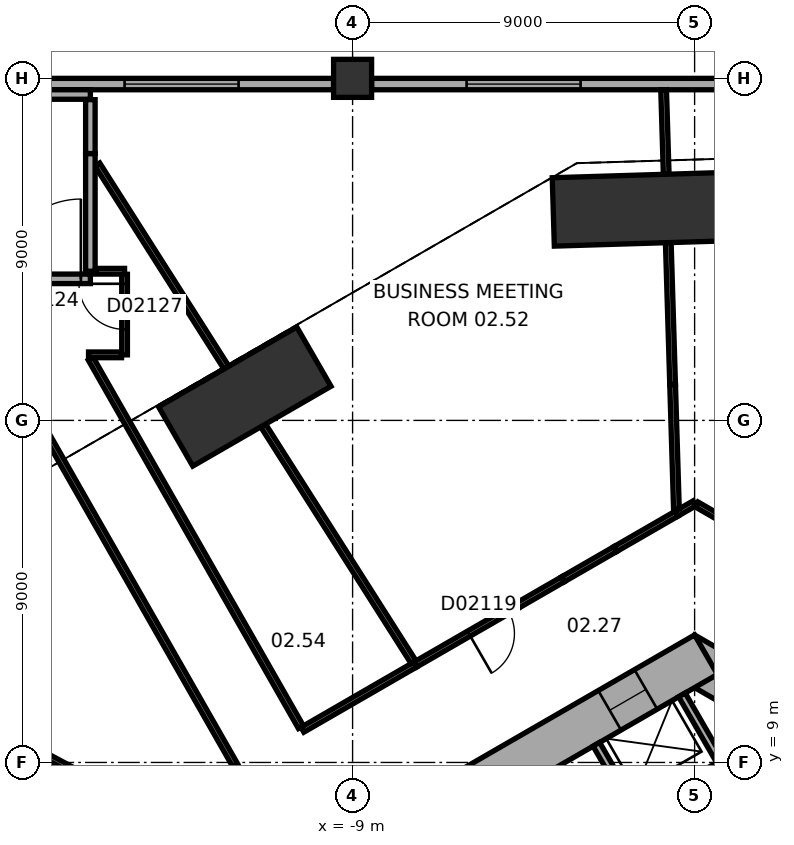
"""IFC4 building model, lengths in metres.
Left out: names, types, materials, properties, quantities, classifications, styles, units other than length and angle.
Written with IfcOpenShell. Run it as: python <this file> out.ifc"""

import sys

from ifc_helpers import new_model, si_unit, direction, frame, frame_2d, origin, origin_2d, place, context, subcontext, project, spatial, rectangle, extrude, element, fill, save


model = new_model("IFC4")
c1 = context("Model", 3, precision=1e-05, world=origin(), true_north=direction((0.0, 1.0)))
c2 = subcontext(c1, "Body", "Model", "MODEL_VIEW")
j1 = project(units=[si_unit("LENGTHUNIT", "METRE"), si_unit("PLANEANGLEUNIT", "RADIAN")], contexts=[c1])
p1 = place(None, origin())
s1 = spatial("IfcSite", under=j1, at=p1, CompositionType="ELEMENT")
p2 = place(p1, origin())
s2 = spatial("IfcBuilding", under=s1, at=p2, CompositionType="ELEMENT")
p3 = place(p2, frame((0.0, 0.0, 13.0)))
s3 = spatial("IfcBuildingStorey", under=s2, at=p3, CompositionType="ELEMENT", Elevation=13.0)
p4 = place(p3, frame((-0.72, 23.577, 0.0), z_axis=(0.0, 0.0, 1.0), x_axis=(-0.999533644135, -0.030536768695, 0.0)))
e1 = element("IfcColumn", 1, at=p4, inside=s3, PredefinedType="COLUMN", context=c2, shape_type="SweptSolid", body=[
    extrude(rectangle(XDim=6.0, YDim=1.8, at=origin_2d()), origin(), (0.0, 0.0, 1.0), 8.0),
])
p5 = place(p3, frame((-11.837, 18.627, 0.0), z_axis=(0.0, 0.0, 1.0), x_axis=(-0.866028021766, -0.499995465495, 0.0)))
e2 = element("IfcColumn", 2, at=p5, inside=s3, PredefinedType="COLUMN", context=c2, shape_type="SweptSolid", body=[
    extrude(rectangle(XDim=4.2, YDim=1.8, at=origin_2d()), origin(), (0.0, 0.0, 1.0), 8.0),
])
p6 = place(p3, frame((-9.0, 27.0, 0.0), z_axis=(0.0, 0.0, 1.0), x_axis=(1.0, 0.0, 0.0)))
e3 = element("IfcColumn", 3, at=p6, inside=s3, PredefinedType="COLUMN", context=c2, shape_type="SweptSolid", body=[
    extrude(rectangle(XDim=1.0, YDim=1.0, at=origin_2d()), origin(), (0.0, 0.0, 1.0), 8.0),
])
p7 = place(p3, frame((10.4, 5.658, 0.0), z_axis=(0.0, 0.0, 1.0), x_axis=(-0.866021384402, 0.500006961711, 0.0)))
e4 = element("IfcWall", 4, at=p7, inside=s3, PredefinedType="SHEAR", context=c2, shape_type="SweptSolid", body=[
    extrude(rectangle(XDim=12.355, YDim=1.2, at=frame_2d((6.178, 0.0))), origin(), (0.0, 0.0, 1.0), 8.0),
])
p8 = place(p7, frame((2.728, 0.0, 0.0)))
e5 = element("IfcOpeningElement", 5, at=p8, cuts=e4, PredefinedType="OPENING", context=c2, shape_type="SweptSolid", body=[
    extrude(rectangle(XDim=1.1, YDim=2.1, at=frame_2d((0.55, 1.05))), frame((0.0, 0.61, 0.0), z_axis=(0.0, -1.0, 0.0), x_axis=(1.0, 0.0, 0.0)), (0.0, 0.0, 1.0), 1.22),
])
p9 = place(p7, frame((5.328, 0.0, 0.0)))
e6 = element("IfcOpeningElement", 6, at=p9, cuts=e4, PredefinedType="OPENING", context=c2, shape_type="SweptSolid", body=[
    extrude(rectangle(XDim=1.1, YDim=2.1, at=frame_2d((0.55, 1.05))), frame((0.0, 0.61, 0.0), z_axis=(0.0, -1.0, 0.0), x_axis=(1.0, 0.0, 0.0)), (0.0, 0.0, 1.0), 1.22),
])
p10 = place(p7, frame((7.928, 0.0, 0.0)))
e7 = element("IfcOpeningElement", 7, at=p10, cuts=e4, PredefinedType="OPENING", context=c2, shape_type="SweptSolid", body=[
    extrude(rectangle(XDim=1.1, YDim=2.1, at=frame_2d((0.55, 1.05))), frame((0.0, 0.61, 0.0), z_axis=(0.0, -1.0, 0.0), x_axis=(1.0, 0.0, 0.0)), (0.0, 0.0, 1.0), 1.22),
])
p11 = place(p3, frame((0.3, 11.836, 0.0), z_axis=(0.0, 0.0, 1.0), x_axis=(-0.866021384402, -0.500006961711, 0.0)))
e8 = element("IfcWall", 8, at=p11, inside=s3, PredefinedType="SHEAR", context=c2, shape_type="SweptSolid", body=[
    extrude(rectangle(XDim=12.355, YDim=1.2, at=frame_2d((6.178, 0.0))), origin(), (0.0, 0.0, 1.0), 8.0),
])
p12 = place(p11, frame((6.378, 0.0, 0.0)))
e9 = element("IfcOpeningElement", 9, at=p12, cuts=e8, PredefinedType="OPENING", context=c2, shape_type="SweptSolid", body=[
    extrude(rectangle(XDim=1.5, YDim=2.1, at=frame_2d((0.75, 1.05))), frame((0.0, 0.61, 0.0), z_axis=(0.0, -1.0, 0.0), x_axis=(1.0, 0.0, 0.0)), (0.0, 0.0, 1.0), 1.22),
])
p13 = place(p11, frame((1.828, 0.0, 0.0)))
e10 = element("IfcOpeningElement", 10, at=p13, cuts=e8, PredefinedType="OPENING", context=c2, shape_type="SweptSolid", body=[
    extrude(rectangle(XDim=1.1, YDim=2.1, at=frame_2d((0.55, 1.05))), frame((0.0, 0.61, 0.0), z_axis=(0.0, -1.0, 0.0), x_axis=(1.0, 0.0, 0.0)), (0.0, 0.0, 1.0), 1.22),
])
p14 = place(p3, frame((8.5, 26.85, 0.0), z_axis=(0.0, 0.0, 1.0), x_axis=(-1.0, 0.0, 0.0)))
e11 = element("IfcWall", 11, at=p14, inside=s3, PredefinedType="STANDARD", context=c2, shape_type="SweptSolid", body=[
    extrude(rectangle(XDim=17.0, YDim=0.3, at=frame_2d((8.5, 0.0))), origin(), (0.0, 0.0, 1.0), 6.5),
])
p15 = place(p14, frame((2.5, 0.0, 1.0)))
e12 = element("IfcOpeningElement", 12, at=p15, cuts=e11, PredefinedType="OPENING", context=c2, shape_type="SweptSolid", body=[
    extrude(rectangle(XDim=3.0, YDim=4.0, at=frame_2d((1.5, 2.0))), frame((0.0, 0.16, 0.0), z_axis=(0.0, -1.0, 0.0), x_axis=(1.0, 0.0, 0.0)), (0.0, 0.0, 1.0), 0.32),
])
p16 = place(p14, frame((11.5, 0.0, 1.0)))
e13 = element("IfcOpeningElement", 13, at=p16, cuts=e11, PredefinedType="OPENING", context=c2, shape_type="SweptSolid", body=[
    extrude(rectangle(XDim=3.0, YDim=4.0, at=frame_2d((1.5, 2.0))), frame((0.0, 0.16, 0.0), z_axis=(0.0, -1.0, 0.0), x_axis=(1.0, 0.0, 0.0)), (0.0, 0.0, 1.0), 0.32),
])
p17 = place(p3, frame((-9.5, 26.85, 0.0), z_axis=(0.0, 0.0, 1.0), x_axis=(-1.0, 0.0, 0.0)))
e14 = element("IfcWall", 14, at=p17, inside=s3, PredefinedType="STANDARD", context=c2, shape_type="SweptSolid", body=[
    extrude(rectangle(XDim=17.0, YDim=0.3, at=frame_2d((8.5, 0.0))), origin(), (0.0, 0.0, 1.0), 6.5),
])
p18 = place(p17, frame((2.5, 0.0, 1.0)))
e15 = element("IfcOpeningElement", 15, at=p18, cuts=e14, PredefinedType="OPENING", context=c2, shape_type="SweptSolid", body=[
    extrude(rectangle(XDim=3.0, YDim=4.0, at=frame_2d((1.5, 2.0))), frame((0.0, 0.16, 0.0), z_axis=(0.0, -1.0, 0.0), x_axis=(1.0, 0.0, 0.0)), (0.0, 0.0, 1.0), 0.32),
])
p19 = place(p17, frame((11.5, 0.0, 1.0)))
e16 = element("IfcOpeningElement", 16, at=p19, cuts=e14, PredefinedType="OPENING", context=c2, shape_type="SweptSolid", body=[
    extrude(rectangle(XDim=3.0, YDim=4.0, at=frame_2d((1.5, 2.0))), frame((0.0, 0.16, 0.0), z_axis=(0.0, -1.0, 0.0), x_axis=(1.0, 0.0, 0.0)), (0.0, 0.0, 1.0), 0.32),
])
p20 = place(p3, frame((0.532, 8.122, 0.0), z_axis=(0.0, 0.0, 1.0), x_axis=(0.500077893725, 0.86598042715, 0.0)))
e17 = element("IfcWall", 17, at=p20, inside=s3, PredefinedType="PARTITIONING", context=c2, shape_type="SweptSolid", body=[
    extrude(rectangle(XDim=2.2, YDim=0.2, at=frame_2d((1.1, 0.0))), origin(), (0.0, 0.0, 1.0), 7.7),
])
p21 = place(p3, frame((0.803, 9.009, 0.0), z_axis=(0.0, 0.0, 1.0), x_axis=(-0.866028230842, -0.499995103361, 0.0)))
e18 = element("IfcWall", 18, at=p21, inside=s3, PredefinedType="PARTITIONING", context=c2, shape_type="SweptSolid", body=[
    extrude(rectangle(XDim=5.4, YDim=0.2, at=frame_2d((2.7, 0.0))), origin(), (0.0, 0.0, 1.0), 7.7),
])
p22 = place(p3, frame((0.767, 8.872, 0.0), z_axis=(0.0, 0.0, 1.0), x_axis=(-0.499994660107, 0.866028486751, 0.0)))
e19 = element("IfcWall", 19, at=p22, inside=s3, PredefinedType="PARTITIONING", context=c2, shape_type="SweptSolid", body=[
    extrude(rectangle(XDim=2.2, YDim=0.2, at=frame_2d((1.1, 0.0))), origin(), (0.0, 0.0, 1.0), 7.7),
])
p23 = place(p3, frame((-1.485, 7.572, 0.0), z_axis=(0.0, 0.0, 1.0), x_axis=(-0.50002983664, 0.866008176907, 0.0)))
e20 = element("IfcWall", 20, at=p23, inside=s3, PredefinedType="PARTITIONING", context=c2, shape_type="SweptSolid", body=[
    extrude(rectangle(XDim=2.2, YDim=0.2, at=frame_2d((1.1, 0.0))), origin(), (0.0, 0.0, 1.0), 7.7),
])
p24 = place(p3, frame((-13.806, 7.418, 0.0), z_axis=(0.0, 0.0, 1.0), x_axis=(-0.880891557551, 0.473318142305, 0.0)))
e21 = element("IfcWall", 21, at=p24, inside=s3, PredefinedType="PARTITIONING", context=c2, shape_type="SweptSolid", body=[
    extrude(rectangle(XDim=7.787, YDim=0.15, at=frame_2d((3.894, 0.0))), origin(), (0.0, 0.0, 1.0), 7.7),
])
p25 = place(p3, frame((-12.092, 8.93, 0.0), z_axis=(0.0, 0.0, 1.0), x_axis=(-0.495564220718, 0.868571299977, 0.0)))
e22 = element("IfcWall", 22, at=p25, inside=s3, PredefinedType="PARTITIONING", context=c2, shape_type="SweptSolid", body=[
    extrude(rectangle(XDim=11.988, YDim=0.15, at=frame_2d((5.994, 0.0))), origin(), (0.0, 0.0, 1.0), 7.7),
])
p26 = place(p3, frame((-10.321, 9.861, 0.0), z_axis=(0.0, 0.0, 1.0), x_axis=(0.865970719175, 0.500094704563, 0.0)))
e23 = element("IfcWall", 23, at=p26, inside=s3, PredefinedType="PARTITIONING", context=c2, shape_type="SweptSolid", body=[
    extrude(rectangle(XDim=3.425, YDim=0.15, at=frame_2d((1.712, 0.0))), origin(), (0.0, 0.0, 1.0), 7.7),
])
p27 = place(p3, frame((-7.354, 11.573, 0.0), z_axis=(0.0, 0.0, 1.0), x_axis=(0.866051051954, 0.499955573435, 0.0)))
e24 = element("IfcWall", 24, at=p27, inside=s3, PredefinedType="PARTITIONING", context=c2, shape_type="SweptSolid", body=[
    extrude(rectangle(XDim=3.082, YDim=0.15, at=frame_2d((1.541, 0.0))), origin(), (0.0, 0.0, 1.0), 7.7),
])
p28 = place(p27, frame((1.632, 0.0, 0.0)))
e25 = element("IfcOpeningElement", 25, at=p28, cuts=e24, PredefinedType="OPENING", context=c2, shape_type="SweptSolid", body=[
    extrude(rectangle(XDim=1.2, YDim=2.1, at=frame_2d((0.6, 1.05))), frame((0.0, 0.085, 0.0), z_axis=(0.0, -1.0, 0.0), x_axis=(1.0, 0.0, 0.0)), (0.0, 0.0, 1.0), 0.17),
])
p29 = place(p3, frame((-7.397, 11.641, 0.0), z_axis=(0.0, 0.0, 1.0), x_axis=(-0.536312130721, 0.844019726334, 0.0)))
e26 = element("IfcWall", 26, at=p29, inside=s3, PredefinedType="PARTITIONING", context=c2, shape_type="SweptSolid", body=[
    extrude(rectangle(XDim=7.376, YDim=0.15, at=frame_2d((3.688, 0.0))), origin(), (0.0, 0.0, 1.0), 7.7),
])
p30 = place(p3, frame((-3.46, 13.822, 0.0), z_axis=(0.0, 0.0, 1.0), x_axis=(-0.866004557827, -0.500036104519, 0.0)))
e27 = element("IfcWall", 27, at=p30, inside=s3, PredefinedType="PARTITIONING", context=c2, shape_type="SweptSolid", body=[
    extrude(rectangle(XDim=1.415, YDim=0.15, at=frame_2d((0.708, 0.0))), origin(), (0.0, 0.0, 1.0), 7.7),
])
p31 = place(p3, frame((3.386, 13.865, 0.0), z_axis=(0.0, 0.0, 1.0), x_axis=(-0.866006051527, 0.500033517596, 0.0)))
e28 = element("IfcWall", 28, at=p31, inside=s3, PredefinedType="PARTITIONING", context=c2, shape_type="SweptSolid", body=[
    extrude(rectangle(XDim=3.85, YDim=0.15, at=frame_2d((1.925, 0.0))), origin(), (0.0, 0.0, 1.0), 7.7),
])
p32 = place(p3, frame((-2.087, 14.615, 0.0), z_axis=(0.0, 0.0, 1.0), x_axis=(-0.866054784643, -0.499949107407, 0.0)))
e29 = element("IfcWall", 29, at=p32, inside=s3, PredefinedType="PARTITIONING", context=c2, shape_type="SweptSolid", body=[
    extrude(rectangle(XDim=1.585, YDim=0.15, at=frame_2d((0.792, 0.0))), origin(), (0.0, 0.0, 1.0), 7.7),
])
p33 = place(p3, frame((-2.087, 14.615, 0.0), z_axis=(0.0, 0.0, 1.0), x_axis=(0.866006459158, 0.500032811619, 0.0)))
e30 = element("IfcWall", 30, at=p33, inside=s3, PredefinedType="PARTITIONING", context=c2, shape_type="SweptSolid", body=[
    extrude(rectangle(XDim=1.861, YDim=0.15, at=frame_2d((0.931, 0.0))), origin(), (0.0, 0.0, 1.0), 7.7),
])
p34 = place(p3, frame((-0.475, 15.545, 0.0), z_axis=(0.0, 0.0, 1.0), x_axis=(0.865933599817, 0.500158975434, 0.0)))
e31 = element("IfcWall", 31, at=p34, inside=s3, PredefinedType="PARTITIONING", context=c2, shape_type="SweptSolid", body=[
    extrude(rectangle(XDim=0.549, YDim=0.15, at=frame_2d((0.274, 0.0))), origin(), (0.0, 0.0, 1.0), 7.7),
])
p35 = place(p3, frame((-0.579, 18.946, 0.0), z_axis=(0.0, 0.0, 1.0), x_axis=(0.030572886356, -0.999532540051, 0.0)))
e32 = element("IfcWall", 32, at=p35, inside=s3, PredefinedType="PARTITIONING", context=c2, shape_type="SweptSolid", body=[
    extrude(rectangle(XDim=3.282, YDim=0.15, at=frame_2d((1.641, 0.0))), origin(), (0.0, 0.0, 1.0), 7.7),
])
p36 = place(p3, frame((-0.579, 18.946, 0.0), z_axis=(0.0, 0.0, 1.0), x_axis=(-0.030471255388, 0.999535643484, 0.0)))
e33 = element("IfcWall", 33, at=p36, inside=s3, PredefinedType="PARTITIONING", context=c2, shape_type="SweptSolid", body=[
    extrude(rectangle(XDim=3.734, YDim=0.15, at=frame_2d((1.867, 0.0))), origin(), (0.0, 0.0, 1.0), 7.7),
])
p37 = place(p3, frame((-12.32, 19.387, 0.0), z_axis=(0.0, 0.0, 1.0), x_axis=(-0.536309341483, 0.844021498682, 0.0)))
e34 = element("IfcWall", 34, at=p37, inside=s3, PredefinedType="PARTITIONING", context=c2, shape_type="SweptSolid", body=[
    extrude(rectangle(XDim=6.335, YDim=0.15, at=frame_2d((3.168, 0.0))), origin(), (0.0, 0.0, 1.0), 7.7),
])
p38 = place(p3, frame((-15.889, 19.621, 0.0), z_axis=(0.0, 0.0, 1.0), x_axis=(0.495540263005, -0.868584968636, 0.0)))
e35 = element("IfcWall", 35, at=p38, inside=s3, PredefinedType="PARTITIONING", context=c2, shape_type="SweptSolid", body=[
    extrude(rectangle(XDim=11.157, YDim=0.15, at=frame_2d((5.579, 0.0))), origin(), (0.0, 0.0, 1.0), 7.7),
])
p39 = place(p3, frame((-15.08, 19.725, 0.0), z_axis=(0.0, 0.0, 1.0), x_axis=(-1.0, 0.0, 0.0)))
e36 = element("IfcWall", 36, at=p39, inside=s3, PredefinedType="PARTITIONING", context=c2, shape_type="SweptSolid", body=[
    extrude(rectangle(XDim=0.868, YDim=0.15, at=frame_2d((0.434, 0.0))), origin(), (0.0, 0.0, 1.0), 7.7),
])
p40 = place(p3, frame((-15.9, 21.725, 0.0), z_axis=(0.0, 0.0, 1.0), x_axis=(-1.0, 0.0, 0.0)))
e37 = element("IfcWall", 37, at=p40, inside=s3, PredefinedType="SOLIDWALL", context=c2, shape_type="SweptSolid", body=[
    extrude(rectangle(XDim=3.3, YDim=0.25, at=frame_2d((1.65, 0.0))), origin(), (0.0, 0.0, 1.0), 7.7),
])
p41 = place(p40, frame((0.25, 0.0, 0.0)))
e38 = element("IfcOpeningElement", 38, at=p41, cuts=e37, PredefinedType="OPENING", context=c2, shape_type="SweptSolid", body=[
    extrude(rectangle(XDim=2.1, YDim=2.4, at=frame_2d((1.05, 1.2))), frame((0.0, 0.135, 0.0), z_axis=(0.0, -1.0, 0.0), x_axis=(1.0, 0.0, 0.0)), (0.0, 0.0, 1.0), 0.27),
])
p42 = place(p3, frame((-15.0, 21.845, 0.0), z_axis=(0.0, 0.0, 1.0), x_axis=(0.0, -1.0, 0.0)))
e39 = element("IfcWall", 39, at=p42, inside=s3, PredefinedType="PARTITIONING", context=c2, shape_type="SweptSolid", body=[
    extrude(rectangle(XDim=2.12, YDim=0.15, at=frame_2d((1.06, 0.0))), origin(), (0.0, 0.0, 1.0), 7.7),
])
p43 = place(p42, frame((0.25, 0.0, 0.0)))
e40 = element("IfcOpeningElement", 40, at=p43, cuts=e39, PredefinedType="OPENING", context=c2, shape_type="SweptSolid", body=[
    extrude(rectangle(XDim=1.2, YDim=2.1, at=frame_2d((0.6, 1.05))), frame((0.0, 0.085, 0.0), z_axis=(0.0, -1.0, 0.0), x_axis=(1.0, 0.0, 0.0)), (0.0, 0.0, 1.0), 0.17),
])
p44 = place(p3, frame((-15.76, 21.925, 0.0), z_axis=(0.0, 0.0, 1.0), x_axis=(1.0, 0.0, 0.0)))
e41 = element("IfcWall", 41, at=p44, inside=s3, PredefinedType="PARTITIONING", context=c2, shape_type="SweptSolid", body=[
    extrude(rectangle(XDim=0.76, YDim=0.15, at=frame_2d((0.38, 0.0))), origin(), (0.0, 0.0, 1.0), 7.7),
])
p45 = place(p3, frame((-0.748, 24.477, 0.0), z_axis=(0.0, 0.0, 1.0), x_axis=(-0.030405439098, 0.999537647752, 0.0)))
e42 = element("IfcWall", 42, at=p45, inside=s3, PredefinedType="PARTITIONING", context=c2, shape_type="SweptSolid", body=[
    extrude(rectangle(XDim=2.224, YDim=0.15, at=frame_2d((1.112, 0.0))), origin(), (0.0, 0.0, 1.0), 7.7),
])
p46 = place(p3, frame((-15.9, 25.021, 0.0), z_axis=(0.0, 0.0, 1.0), x_axis=(0.0, -1.0, 0.0)))
e43 = element("IfcWall", 43, at=p46, inside=s3, PredefinedType="SOLIDWALL", context=c2, shape_type="SweptSolid", body=[
    extrude(rectangle(XDim=3.096, YDim=0.25, at=frame_2d((1.548, 0.0))), origin(), (0.0, 0.0, 1.0), 7.7),
])
p47 = place(p3, frame((-15.9, 26.44, 0.0), z_axis=(0.0, 0.0, 1.0), x_axis=(0.0, -1.0, 0.0)))
e44 = element("IfcWall", 44, at=p47, inside=s3, PredefinedType="SOLIDWALL", context=c2, shape_type="SweptSolid", body=[
    extrude(rectangle(XDim=1.418, YDim=0.25, at=frame_2d((0.709, 0.0))), origin(), (0.0, 0.0, 1.0), 7.7),
])
p48 = place(p3, frame((-26.45, 26.575, 0.0), z_axis=(0.0, 0.0, 1.0), x_axis=(1.0, 0.0, 0.0)))
e45 = element("IfcWall", 45, at=p48, inside=s3, PredefinedType="SOLIDWALL", context=c2, shape_type="SweptSolid", body=[
    extrude(rectangle(XDim=10.55, YDim=0.25, at=frame_2d((5.275, 0.0))), origin(), (0.0, 0.0, 1.0), 7.7),
])
p49 = place(p16, origin())
e46 = element("IfcWindow", 46, at=p49, inside=s3, PartitioningType="SINGLE_PANEL", PredefinedType="WINDOW", context=c2, shape_type="SweptSolid", body=[
    extrude(rectangle(XDim=3.0, YDim=4.0, at=frame_2d((1.5, 2.0))), frame((0.0, 0.03, 0.0), z_axis=(0.0, -1.0, 0.0), x_axis=(1.0, 0.0, 0.0)), (0.0, 0.0, 1.0), 0.06),
])
fill(e13, e46)
p50 = place(p18, origin())
e47 = element("IfcWindow", 47, at=p50, inside=s3, PartitioningType="SINGLE_PANEL", PredefinedType="WINDOW", context=c2, shape_type="SweptSolid", body=[
    extrude(rectangle(XDim=3.0, YDim=4.0, at=frame_2d((1.5, 2.0))), frame((0.0, 0.03, 0.0), z_axis=(0.0, -1.0, 0.0), x_axis=(1.0, 0.0, 0.0)), (0.0, 0.0, 1.0), 0.06),
])
fill(e15, e47)
p51 = place(p13, origin())
e48 = element("IfcDoor", 48, at=p51, inside=s3, OperationType="DOUBLE_DOOR_SLIDING", PredefinedType="DOOR", context=c2, shape_type="SweptSolid", body=[
    extrude(rectangle(XDim=1.1, YDim=2.1, at=frame_2d((0.55, 1.05))), frame((0.0, 0.025, 0.0), z_axis=(0.0, -1.0, 0.0), x_axis=(1.0, 0.0, 0.0)), (0.0, 0.0, 1.0), 0.05),
])
fill(e10, e48)
p52 = place(p28, origin())
e49 = element("IfcDoor", 49, at=p52, inside=s3, OperationType="SINGLE_SWING_LEFT", PredefinedType="DOOR", context=c2, shape_type="SweptSolid", body=[
    extrude(rectangle(XDim=1.2, YDim=2.1, at=frame_2d((0.6, 1.05))), frame((0.0, 0.025, 0.0), z_axis=(0.0, -1.0, 0.0), x_axis=(1.0, 0.0, 0.0)), (0.0, 0.0, 1.0), 0.05),
])
fill(e25, e49)
p53 = place(p41, frame((2.1, 0.0, 0.0), z_axis=(0.0, 0.0, 1.0), x_axis=(-1.0, 0.0, 0.0)))
e50 = element("IfcDoor", 50, at=p53, inside=s3, OperationType="DOUBLE_DOOR_SINGLE_SWING", PredefinedType="DOOR", context=c2, shape_type="SweptSolid", body=[
    extrude(rectangle(XDim=2.1, YDim=2.4, at=frame_2d((1.05, 1.2))), frame((0.0, 0.025, 0.0), z_axis=(0.0, -1.0, 0.0), x_axis=(1.0, 0.0, 0.0)), (0.0, 0.0, 1.0), 0.05),
])
fill(e38, e50)
p54 = place(p43, origin())
e51 = element("IfcDoor", 51, at=p54, inside=s3, OperationType="SINGLE_SWING_LEFT", PredefinedType="DOOR", context=c2, shape_type="SweptSolid", body=[
    extrude(rectangle(XDim=1.2, YDim=2.1, at=frame_2d((0.6, 1.05))), frame((0.0, 0.025, 0.0), z_axis=(0.0, -1.0, 0.0), x_axis=(1.0, 0.0, 0.0)), (0.0, 0.0, 1.0), 0.05),
])
fill(e40, e51)
save(model, sys.argv[1])
